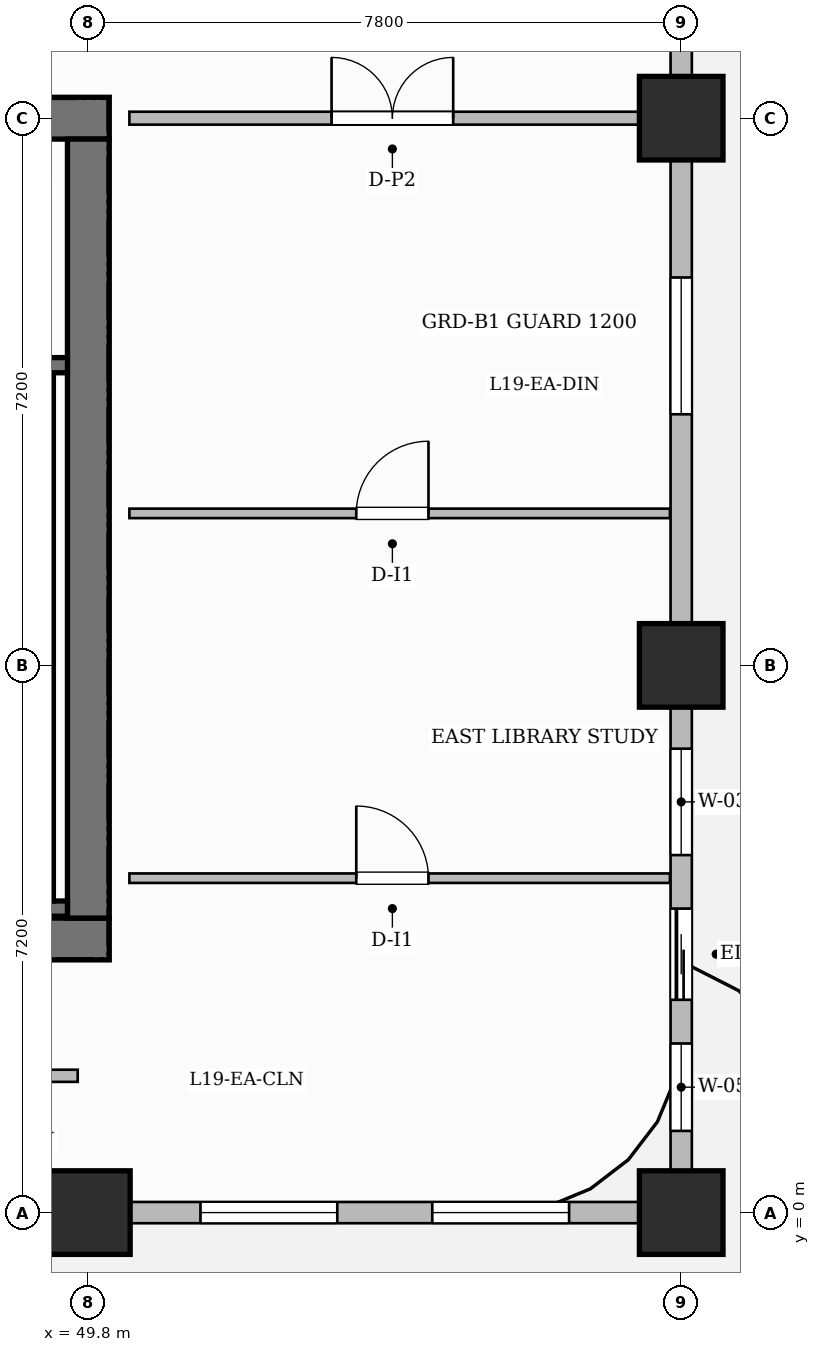
"""IFC4 building model, lengths in metres.
Left out: names, types, materials, properties, quantities, classifications, styles, units other than length and angle.
Written with IfcOpenShell. Run it as: python <this file> out.ifc"""

import sys

from ifc_helpers import new_model, si_unit, direction, frame, frame_2d, origin, origin_2d, place, context, subcontext, project, spatial, rectangle, extrude, source, transform, mapped, element, fill, save


model = new_model("IFC4")
c1 = context("Model", 3, precision=1e-05, world=origin(), true_north=direction((0.0, 1.0)))
c2 = subcontext(c1, "Body", "Model", "MODEL_VIEW")
j1 = project(units=[si_unit("LENGTHUNIT", "METRE"), si_unit("PLANEANGLEUNIT", "RADIAN")], contexts=[c1])
p1 = place(None, origin())
s1 = spatial("IfcSite", under=j1, at=p1, CompositionType="ELEMENT")
p2 = place(p1, origin())
s2 = spatial("IfcBuilding", under=s1, at=p2, CompositionType="ELEMENT")
p3 = place(p2, frame((0.0, 0.0, 80.5)))
s3 = spatial("IfcBuildingStorey", under=s2, at=p3, CompositionType="ELEMENT", Elevation=80.5)
p4 = place(p3, frame((34.525, 3.6, 0.0), z_axis=(0.0, 0.0, 1.0), x_axis=(1.0, 0.0, 0.0)))
e1 = element("IfcWall", 1, at=p4, inside=s3, PredefinedType="SHEAR", context=c2, shape_type="SweptSolid", body=[
    extrude(rectangle(XDim=15.55, YDim=0.55, at=frame_2d((7.775, 0.0))), origin(), (0.0, 0.0, 1.0), 3.7),
])
p5 = place(p4, frame((4.105, 0.0, 0.0)))
e2 = element("IfcOpeningElement", 2, at=p5, cuts=e1, PredefinedType="OPENING", context=c2, shape_type="SweptSolid", body=[
    extrude(rectangle(XDim=0.9, YDim=2.1, at=frame_2d((0.45, 1.05))), frame((0.0, 0.285, 0.0), z_axis=(0.0, -1.0, 0.0), x_axis=(1.0, 0.0, 0.0)), (0.0, 0.0, 1.0), 0.57),
])
p6 = place(p4, frame((5.675, 0.0, 0.0)))
e3 = element("IfcOpeningElement", 3, at=p6, cuts=e1, PredefinedType="OPENING", context=c2, shape_type="SweptSolid", body=[
    extrude(rectangle(XDim=0.9, YDim=2.1, at=frame_2d((0.45, 1.05))), frame((0.0, 0.285, 0.0), z_axis=(0.0, -1.0, 0.0), x_axis=(1.0, 0.0, 0.0)), (0.0, 0.0, 1.0), 0.57),
])
p7 = place(p4, frame((7.275, 0.0, 0.0)))
e4 = element("IfcOpeningElement", 4, at=p7, cuts=e1, PredefinedType="OPENING", context=c2, shape_type="SweptSolid", body=[
    extrude(rectangle(XDim=0.9, YDim=2.1, at=frame_2d((0.45, 1.05))), frame((0.0, 0.285, 0.0), z_axis=(0.0, -1.0, 0.0), x_axis=(1.0, 0.0, 0.0)), (0.0, 0.0, 1.0), 0.57),
])
p8 = place(p3, frame((34.525, 14.4, 0.0), z_axis=(0.0, 0.0, 1.0), x_axis=(1.0, 0.0, 0.0)))
e5 = element("IfcWall", 5, at=p8, inside=s3, PredefinedType="SHEAR", context=c2, shape_type="SweptSolid", body=[
    extrude(rectangle(XDim=15.55, YDim=0.55, at=frame_2d((7.775, 0.0))), origin(), (0.0, 0.0, 1.0), 3.7),
])
p9 = place(p8, frame((5.405, 0.0, 0.0)))
e6 = element("IfcOpeningElement", 6, at=p9, cuts=e5, PredefinedType="OPENING", context=c2, shape_type="SweptSolid", body=[
    extrude(rectangle(XDim=1.5, YDim=2.2, at=frame_2d((0.75, 1.1))), frame((0.0, 0.285, 0.0), z_axis=(0.0, -1.0, 0.0), x_axis=(1.0, 0.0, 0.0)), (0.0, 0.0, 1.0), 0.57),
])
p10 = place(p8, frame((1.62, 0.0, 0.0)))
e7 = element("IfcOpeningElement", 7, at=p10, cuts=e5, PredefinedType="OPENING", context=c2, shape_type="SweptSolid", body=[
    extrude(rectangle(XDim=1.05, YDim=2.15, at=frame_2d((0.525, 1.075))), frame((0.0, 0.285, 0.0), z_axis=(0.0, -1.0, 0.0), x_axis=(1.0, 0.0, 0.0)), (0.0, 0.0, 1.0), 0.57),
])
p11 = place(p8, frame((11.25, 0.0, 0.0)))
e8 = element("IfcOpeningElement", 8, at=p11, cuts=e5, PredefinedType="OPENING", context=c2, shape_type="SweptSolid", body=[
    extrude(rectangle(XDim=1.05, YDim=2.15, at=frame_2d((0.525, 1.075))), frame((0.0, 0.285, 0.0), z_axis=(0.0, -1.0, 0.0), x_axis=(1.0, 0.0, 0.0)), (0.0, 0.0, 1.0), 0.57),
])
p12 = place(p3, frame((49.8, 3.875, 0.0), z_axis=(0.0, 0.0, 1.0), x_axis=(0.0, 1.0, 0.0)))
e9 = element("IfcWall", 9, at=p12, inside=s3, PredefinedType="SHEAR", context=c2, shape_type="SweptSolid", body=[
    extrude(rectangle(XDim=10.25, YDim=0.55, at=frame_2d((5.125, 0.0))), origin(), (0.0, 0.0, 1.0), 3.7),
])
m1 = source(origin(), c2, "Body", "SweptSolid", [
    extrude(rectangle(XDim=1.1, YDim=1.1, at=origin_2d()), origin(), (0.0, 0.0, 1.0), 3.7),
])
for number, where, z_axis, x_axis in (
    (10, (49.8, 0.0, 0.0), (0.0, 0.0, 1.0), (1.0, 0.0, 0.0)),
    (11, (57.6, 0.0, 0.0), (0.0, 0.0, 1.0), (1.0, 0.0, 0.0)),
    (12, (57.6, 7.2, 0.0), (0.0, 0.0, 1.0), (1.0, 0.0, 0.0)),
    (13, (57.6, 14.4, 0.0), (0.0, 0.0, 1.0), (1.0, 0.0, 0.0)),
):
    element("IfcColumn", number, at=place(p3, frame(where, z_axis=z_axis, x_axis=x_axis)), inside=s3, PredefinedType="COLUMN", context=c2, shape_type="MappedRepresentation", body=[
        mapped(m1, transform((0.0, 0.0, 0.0), scale=1.0)),
    ])
p13 = place(p3, frame((43.12, 4.0, 0.0), z_axis=(0.0, 0.0, 1.0), x_axis=(1.0, 0.0, 0.0)))
e14 = element("IfcWall", 14, at=p13, inside=s3, PredefinedType="SHEAR", context=c2, shape_type="SweptSolid", body=[
    extrude(rectangle(XDim=6.405, YDim=0.2, at=frame_2d((3.202, 0.0))), origin(), (0.0, 0.0, 1.0), 3.7),
])
p14 = place(p3, frame((49.24, 4.1, 0.0), z_axis=(0.0, 0.0, 1.0), x_axis=(0.0, 1.0, 0.0)))
e15 = element("IfcWall", 15, at=p14, inside=s3, PredefinedType="SHEAR", context=c2, shape_type="SweptSolid", body=[
    extrude(rectangle(XDim=6.95, YDim=0.2, at=frame_2d((3.475, 0.0))), origin(), (0.0, 0.0, 1.0), 3.7),
])
p15 = place(p3, frame((43.12, 11.15, 0.0), z_axis=(0.0, 0.0, 1.0), x_axis=(1.0, 0.0, 0.0)))
e16 = element("IfcWall", 16, at=p15, inside=s3, PredefinedType="SHEAR", context=c2, shape_type="SweptSolid", body=[
    extrude(rectangle(XDim=6.405, YDim=0.2, at=frame_2d((3.202, 0.0))), origin(), (0.0, 0.0, 1.0), 3.7),
])
p16 = place(p15, frame((1.045, 0.0, 0.0)))
e17 = element("IfcOpeningElement", 17, at=p16, cuts=e16, PredefinedType="OPENING", context=c2, shape_type="SweptSolid", body=[
    extrude(rectangle(XDim=1.05, YDim=2.2, at=frame_2d((0.525, 1.1))), frame((0.0, 0.11, 0.0), z_axis=(0.0, -1.0, 0.0), x_axis=(1.0, 0.0, 0.0)), (0.0, 0.0, 1.0), 0.22),
])
p17 = place(p15, frame((4.125, 0.0, 0.0)))
e18 = element("IfcOpeningElement", 18, at=p17, cuts=e16, PredefinedType="OPENING", context=c2, shape_type="SweptSolid", body=[
    extrude(rectangle(XDim=1.05, YDim=2.2, at=frame_2d((0.525, 1.1))), frame((0.0, 0.11, 0.0), z_axis=(0.0, -1.0, 0.0), x_axis=(1.0, 0.0, 0.0)), (0.0, 0.0, 1.0), 0.22),
])
p18 = place(p3, frame((30.29, 1.8, 0.0), z_axis=(0.0, 0.0, 1.0), x_axis=(1.0, 0.0, 0.0)))
e19 = element("IfcWall", 19, at=p18, inside=s3, PredefinedType="PARTITIONING", context=c2, shape_type="SweptSolid", body=[
    extrude(rectangle(XDim=19.37, YDim=0.16, at=frame_2d((9.685, 0.0))), origin(), (0.0, 0.0, 1.0), 3.45),
])
p19 = place(p18, frame((2.916, 0.0, 0.0)))
e20 = element("IfcOpeningElement", 20, at=p19, cuts=e19, PredefinedType="OPENING", context=c2, shape_type="SweptSolid", body=[
    extrude(rectangle(XDim=0.9, YDim=2.15, at=frame_2d((0.45, 1.075))), frame((0.0, 0.09, 0.0), z_axis=(0.0, -1.0, 0.0), x_axis=(1.0, 0.0, 0.0)), (0.0, 0.0, 1.0), 0.18),
])
p20 = place(p18, frame((9.66, 0.0, 0.0)))
e21 = element("IfcOpeningElement", 21, at=p20, cuts=e19, PredefinedType="OPENING", context=c2, shape_type="SweptSolid", body=[
    extrude(rectangle(XDim=0.9, YDim=2.15, at=frame_2d((0.45, 1.075))), frame((0.0, 0.09, 0.0), z_axis=(0.0, -1.0, 0.0), x_axis=(1.0, 0.0, 0.0)), (0.0, 0.0, 1.0), 0.18),
])
p21 = place(p18, frame((15.86, 0.0, 0.0)))
e22 = element("IfcOpeningElement", 22, at=p21, cuts=e19, PredefinedType="OPENING", context=c2, shape_type="SweptSolid", body=[
    extrude(rectangle(XDim=0.9, YDim=2.15, at=frame_2d((0.45, 1.075))), frame((0.0, 0.09, 0.0), z_axis=(0.0, -1.0, 0.0), x_axis=(1.0, 0.0, 0.0)), (0.0, 0.0, 1.0), 0.18),
])
p22 = place(p3, frame((50.34, 14.4, 0.0), z_axis=(0.0, 0.0, 1.0), x_axis=(1.0, 0.0, 0.0)))
e23 = element("IfcWall", 23, at=p22, inside=s3, PredefinedType="PARTITIONING", context=c2, shape_type="SweptSolid", body=[
    extrude(rectangle(XDim=7.07, YDim=0.17, at=frame_2d((3.535, 0.0))), origin(), (0.0, 0.0, 1.0), 2.885),
])
p23 = place(p22, frame((2.66, 0.0, 0.0)))
e24 = element("IfcOpeningElement", 24, at=p23, cuts=e23, PredefinedType="OPENING", context=c2, shape_type="SweptSolid", body=[
    extrude(rectangle(XDim=1.6, YDim=2.4, at=frame_2d((0.8, 1.2))), frame((0.0, 0.095, 0.0), z_axis=(0.0, -1.0, 0.0), x_axis=(1.0, 0.0, 0.0)), (0.0, 0.0, 1.0), 0.19),
])
p24 = place(p3, frame((50.34, 9.2, 0.0), z_axis=(0.0, 0.0, 1.0), x_axis=(1.0, 0.0, 0.0)))
e25 = element("IfcWall", 25, at=p24, inside=s3, PredefinedType="PARTITIONING", context=c2, shape_type="SweptSolid", body=[
    extrude(rectangle(XDim=7.112, YDim=0.125, at=frame_2d((3.556, 0.0))), origin(), (0.0, 0.0, 1.0), 3.45),
])
p25 = place(p24, frame((2.985, 0.0, 0.0)))
e26 = element("IfcOpeningElement", 26, at=p25, cuts=e25, PredefinedType="OPENING", context=c2, shape_type="SweptSolid", body=[
    extrude(rectangle(XDim=0.95, YDim=2.15, at=frame_2d((0.475, 1.075))), frame((0.0, 0.073, 0.0), z_axis=(0.0, -1.0, 0.0), x_axis=(1.0, 0.0, 0.0)), (0.0, 0.0, 1.0), 0.145),
])
p26 = place(p3, frame((50.34, 4.4, 0.0), z_axis=(0.0, 0.0, 1.0), x_axis=(1.0, 0.0, 0.0)))
e27 = element("IfcWall", 27, at=p26, inside=s3, PredefinedType="PARTITIONING", context=c2, shape_type="SweptSolid", body=[
    extrude(rectangle(XDim=7.112, YDim=0.125, at=frame_2d((3.556, 0.0))), origin(), (0.0, 0.0, 1.0), 3.45),
])
p27 = place(p26, frame((2.985, 0.0, 0.0)))
e28 = element("IfcOpeningElement", 28, at=p27, cuts=e27, PredefinedType="OPENING", context=c2, shape_type="SweptSolid", body=[
    extrude(rectangle(XDim=0.95, YDim=2.15, at=frame_2d((0.475, 1.075))), frame((0.0, 0.073, 0.0), z_axis=(0.0, -1.0, 0.0), x_axis=(1.0, 0.0, 0.0)), (0.0, 0.0, 1.0), 0.145),
])
p28 = place(p3, frame((14.4, 0.0, 0.0), z_axis=(0.0, 0.0, 1.0), x_axis=(1.0, 0.0, 0.0)))
e29 = element("IfcWall", 29, at=p28, inside=s3, PredefinedType="SOLIDWALL", context=c2, shape_type="SweptSolid", body=[
    extrude(rectangle(XDim=43.2, YDim=0.28, at=frame_2d((21.6, 0.0))), origin(), (0.0, 0.0, 1.0), 2.885),
])
p29 = place(p28, frame((0.85, 0.0, 0.0)))
e30 = element("IfcOpeningElement", 30, at=p29, cuts=e29, PredefinedType="OPENING", context=c2, shape_type="SweptSolid", body=[
    extrude(rectangle(XDim=1.2, YDim=2.2, at=frame_2d((0.6, 1.1))), frame((0.0, 0.15, 0.0), z_axis=(0.0, -1.0, 0.0), x_axis=(1.0, 0.0, 0.0)), (0.0, 0.0, 1.0), 0.3),
])
p30 = place(p28, frame((2.811, 0.0, 0.8)))
e31 = element("IfcOpeningElement", 31, at=p30, cuts=e29, PredefinedType="OPENING", context=c2, shape_type="SweptSolid", body=[
    extrude(rectangle(XDim=1.8, YDim=1.85, at=frame_2d((0.9, 0.925))), frame((0.0, 0.15, 0.0), z_axis=(0.0, -1.0, 0.0), x_axis=(1.0, 0.0, 0.0)), (0.0, 0.0, 1.0), 0.3),
])
p31 = place(p28, frame((5.269, 0.0, 0.8)))
e32 = element("IfcOpeningElement", 32, at=p31, cuts=e29, PredefinedType="OPENING", context=c2, shape_type="SweptSolid", body=[
    extrude(rectangle(XDim=0.95, YDim=1.75, at=frame_2d((0.475, 0.875))), frame((0.0, 0.15, 0.0), z_axis=(0.0, -1.0, 0.0), x_axis=(1.0, 0.0, 0.0)), (0.0, 0.0, 1.0), 0.3),
])
p32 = place(p28, frame((8.389, 0.0, 0.8)))
e33 = element("IfcOpeningElement", 33, at=p32, cuts=e29, PredefinedType="OPENING", context=c2, shape_type="SweptSolid", body=[
    extrude(rectangle(XDim=1.8, YDim=1.85, at=frame_2d((0.9, 0.925))), frame((0.0, 0.15, 0.0), z_axis=(0.0, -1.0, 0.0), x_axis=(1.0, 0.0, 0.0)), (0.0, 0.0, 1.0), 0.3),
])
p33 = place(p28, frame((11.197, 0.0, 0.8)))
e34 = element("IfcOpeningElement", 34, at=p33, cuts=e29, PredefinedType="OPENING", context=c2, shape_type="SweptSolid", body=[
    extrude(rectangle(XDim=1.8, YDim=1.85, at=frame_2d((0.9, 0.925))), frame((0.0, 0.15, 0.0), z_axis=(0.0, -1.0, 0.0), x_axis=(1.0, 0.0, 0.0)), (0.0, 0.0, 1.0), 0.3),
])
p34 = place(p28, frame((16.804, 0.0, 0.8)))
e35 = element("IfcOpeningElement", 35, at=p34, cuts=e29, PredefinedType="OPENING", context=c2, shape_type="SweptSolid", body=[
    extrude(rectangle(XDim=1.8, YDim=1.85, at=frame_2d((0.9, 0.925))), frame((0.0, 0.15, 0.0), z_axis=(0.0, -1.0, 0.0), x_axis=(1.0, 0.0, 0.0)), (0.0, 0.0, 1.0), 0.3),
])
p35 = place(p28, frame((21.521, 0.0, 0.8)))
e36 = element("IfcOpeningElement", 36, at=p35, cuts=e29, PredefinedType="OPENING", context=c2, shape_type="SweptSolid", body=[
    extrude(rectangle(XDim=0.95, YDim=1.75, at=frame_2d((0.475, 0.875))), frame((0.0, 0.15, 0.0), z_axis=(0.0, -1.0, 0.0), x_axis=(1.0, 0.0, 0.0)), (0.0, 0.0, 1.0), 0.3),
])
p36 = place(p28, frame((23.904, 0.0, 0.8)))
e37 = element("IfcOpeningElement", 37, at=p36, cuts=e29, PredefinedType="OPENING", context=c2, shape_type="SweptSolid", body=[
    extrude(rectangle(XDim=1.8, YDim=1.85, at=frame_2d((0.9, 0.925))), frame((0.0, 0.15, 0.0), z_axis=(0.0, -1.0, 0.0), x_axis=(1.0, 0.0, 0.0)), (0.0, 0.0, 1.0), 0.3),
])
p37 = place(p28, frame((29.681, 0.0, 0.8)))
e38 = element("IfcOpeningElement", 38, at=p37, cuts=e29, PredefinedType="OPENING", context=c2, shape_type="SweptSolid", body=[
    extrude(rectangle(XDim=1.8, YDim=1.85, at=frame_2d((0.9, 0.925))), frame((0.0, 0.15, 0.0), z_axis=(0.0, -1.0, 0.0), x_axis=(1.0, 0.0, 0.0)), (0.0, 0.0, 1.0), 0.3),
])
p38 = place(p28, frame((32.327, 0.0, 0.8)))
e39 = element("IfcOpeningElement", 39, at=p38, cuts=e29, PredefinedType="OPENING", context=c2, shape_type="SweptSolid", body=[
    extrude(rectangle(XDim=1.8, YDim=1.85, at=frame_2d((0.9, 0.925))), frame((0.0, 0.15, 0.0), z_axis=(0.0, -1.0, 0.0), x_axis=(1.0, 0.0, 0.0)), (0.0, 0.0, 1.0), 0.3),
])
p39 = place(p28, frame((36.875, 0.0, 0.8)))
e40 = element("IfcOpeningElement", 40, at=p39, cuts=e29, PredefinedType="OPENING", context=c2, shape_type="SweptSolid", body=[
    extrude(rectangle(XDim=1.8, YDim=1.85, at=frame_2d((0.9, 0.925))), frame((0.0, 0.15, 0.0), z_axis=(0.0, -1.0, 0.0), x_axis=(1.0, 0.0, 0.0)), (0.0, 0.0, 1.0), 0.3),
])
p40 = place(p28, frame((39.925, 0.0, 0.8)))
e41 = element("IfcOpeningElement", 41, at=p40, cuts=e29, PredefinedType="OPENING", context=c2, shape_type="SweptSolid", body=[
    extrude(rectangle(XDim=1.8, YDim=1.85, at=frame_2d((0.9, 0.925))), frame((0.0, 0.15, 0.0), z_axis=(0.0, -1.0, 0.0), x_axis=(1.0, 0.0, 0.0)), (0.0, 0.0, 1.0), 0.3),
])
p41 = place(p3, frame((57.6, 0.05, 0.0), z_axis=(0.0, 0.0, 1.0), x_axis=(0.0, 1.0, 0.0)))
e42 = element("IfcWall", 42, at=p41, inside=s3, PredefinedType="SOLIDWALL", context=c2, shape_type="SweptSolid", body=[
    extrude(rectangle(XDim=21.5, YDim=0.28, at=frame_2d((10.75, 0.0))), origin(), (0.0, 0.0, 1.0), 2.885),
])
p42 = place(p41, frame((2.75, 0.0, 0.0)))
e43 = element("IfcOpeningElement", 43, at=p42, cuts=e42, PredefinedType="OPENING", context=c2, shape_type="SweptSolid", body=[
    extrude(rectangle(XDim=1.2, YDim=2.2, at=frame_2d((0.6, 1.1))), frame((0.0, 0.15, 0.0), z_axis=(0.0, -1.0, 0.0), x_axis=(1.0, 0.0, 0.0)), (0.0, 0.0, 1.0), 0.3),
])
p43 = place(p41, frame((1.025, 0.0, 0.8)))
e44 = element("IfcOpeningElement", 44, at=p43, cuts=e42, PredefinedType="OPENING", context=c2, shape_type="SweptSolid", body=[
    extrude(rectangle(XDim=1.15, YDim=1.8, at=frame_2d((0.575, 0.9))), frame((0.0, 0.15, 0.0), z_axis=(0.0, -1.0, 0.0), x_axis=(1.0, 0.0, 0.0)), (0.0, 0.0, 1.0), 0.3),
])
p44 = place(p41, frame((4.654, 0.0, 0.8)))
e45 = element("IfcOpeningElement", 45, at=p44, cuts=e42, PredefinedType="OPENING", context=c2, shape_type="SweptSolid", body=[
    extrude(rectangle(XDim=1.4, YDim=1.85, at=frame_2d((0.7, 0.925))), frame((0.0, 0.15, 0.0), z_axis=(0.0, -1.0, 0.0), x_axis=(1.0, 0.0, 0.0)), (0.0, 0.0, 1.0), 0.3),
])
p45 = place(p41, frame((10.454, 0.0, 0.8)))
e46 = element("IfcOpeningElement", 46, at=p45, cuts=e42, PredefinedType="OPENING", context=c2, shape_type="SweptSolid", body=[
    extrude(rectangle(XDim=1.8, YDim=1.85, at=frame_2d((0.9, 0.925))), frame((0.0, 0.15, 0.0), z_axis=(0.0, -1.0, 0.0), x_axis=(1.0, 0.0, 0.0)), (0.0, 0.0, 1.0), 0.3),
])
p46 = place(p41, frame((15.621, 0.0, 0.8)))
e47 = element("IfcOpeningElement", 47, at=p46, cuts=e42, PredefinedType="OPENING", context=c2, shape_type="SweptSolid", body=[
    extrude(rectangle(XDim=1.4, YDim=1.85, at=frame_2d((0.7, 0.925))), frame((0.0, 0.15, 0.0), z_axis=(0.0, -1.0, 0.0), x_axis=(1.0, 0.0, 0.0)), (0.0, 0.0, 1.0), 0.3),
])
p47 = place(p41, frame((18.229, 0.0, 0.8)))
e48 = element("IfcOpeningElement", 48, at=p47, cuts=e42, PredefinedType="OPENING", context=c2, shape_type="SweptSolid", body=[
    extrude(rectangle(XDim=1.8, YDim=1.85, at=frame_2d((0.9, 0.925))), frame((0.0, 0.15, 0.0), z_axis=(0.0, -1.0, 0.0), x_axis=(1.0, 0.0, 0.0)), (0.0, 0.0, 1.0), 0.3),
])
m2 = source(origin(), c2, "Body", "SweptSolid", [
    extrude(rectangle(XDim=1.6, YDim=2.4, at=frame_2d((0.8, 1.2))), frame((0.0, 0.025, 0.0), z_axis=(0.0, -1.0, 0.0), x_axis=(1.0, 0.0, 0.0)), (0.0, 0.0, 1.0), 0.05),
])
p48 = place(p23, origin())
e49 = element("IfcDoor", 49, at=p48, inside=s3, OperationType="DOUBLE_DOOR_SINGLE_SWING", PredefinedType="DOOR", context=c2, shape_type="MappedRepresentation", body=[
    mapped(m2, transform((0.0, 0.0, 0.0), scale=1.0)),
])
fill(e24, e49)
m3 = source(origin(), c2, "Body", "SweptSolid", [
    extrude(rectangle(XDim=0.95, YDim=2.15, at=frame_2d((0.475, 1.075))), frame((0.0, 0.025, 0.0), z_axis=(0.0, -1.0, 0.0), x_axis=(1.0, 0.0, 0.0)), (0.0, 0.0, 1.0), 0.05),
])
p49 = place(p25, origin())
e50 = element("IfcDoor", 50, at=p49, inside=s3, OperationType="SINGLE_SWING_RIGHT", PredefinedType="DOOR", context=c2, shape_type="MappedRepresentation", body=[
    mapped(m3, transform((0.0, 0.0, 0.0), scale=1.0)),
])
fill(e26, e50)
p50 = place(p27, origin())
e51 = element("IfcDoor", 51, at=p50, inside=s3, OperationType="SINGLE_SWING_LEFT", PredefinedType="DOOR", context=c2, shape_type="MappedRepresentation", body=[
    mapped(m3, transform((0.0, 0.0, 0.0), scale=1.0)),
])
fill(e28, e51)
m4 = source(origin(), c2, "Body", "SweptSolid", [
    extrude(rectangle(XDim=1.2, YDim=2.2, at=frame_2d((0.6, 1.1))), frame((0.0, 0.025, 0.0), z_axis=(0.0, -1.0, 0.0), x_axis=(1.0, 0.0, 0.0)), (0.0, 0.0, 1.0), 0.05),
])
p51 = place(p42, origin())
e52 = element("IfcDoor", 52, at=p51, inside=s3, OperationType="SLIDING_TO_LEFT", PredefinedType="DOOR", context=c2, shape_type="MappedRepresentation", body=[
    mapped(m4, transform((0.0, 0.0, 0.0), scale=1.0)),
])
fill(e43, e52)
m5 = source(origin(), c2, "Body", "SweptSolid", [
    extrude(rectangle(XDim=1.8, YDim=1.85, at=frame_2d((0.9, 0.925))), frame((0.0, 0.03, 0.0), z_axis=(0.0, -1.0, 0.0), x_axis=(1.0, 0.0, 0.0)), (0.0, 0.0, 1.0), 0.06),
])
p52 = place(p39, origin())
e53 = element("IfcWindow", 53, at=p52, inside=s3, PartitioningType="DOUBLE_PANEL_VERTICAL", PredefinedType="WINDOW", context=c2, shape_type="MappedRepresentation", body=[
    mapped(m5, transform((0.0, 0.0, 0.0), scale=1.0)),
])
fill(e40, e53)
p53 = place(p40, origin())
e54 = element("IfcWindow", 54, at=p53, inside=s3, PartitioningType="DOUBLE_PANEL_VERTICAL", PredefinedType="WINDOW", context=c2, shape_type="MappedRepresentation", body=[
    mapped(m5, transform((0.0, 0.0, 0.0), scale=1.0)),
])
fill(e41, e54)
m6 = source(origin(), c2, "Body", "SweptSolid", [
    extrude(rectangle(XDim=1.15, YDim=1.8, at=frame_2d((0.575, 0.9))), frame((0.0, 0.03, 0.0), z_axis=(0.0, -1.0, 0.0), x_axis=(1.0, 0.0, 0.0)), (0.0, 0.0, 1.0), 0.06),
])
p54 = place(p43, origin())
e55 = element("IfcWindow", 55, at=p54, inside=s3, PartitioningType="SINGLE_PANEL", PredefinedType="WINDOW", context=c2, shape_type="MappedRepresentation", body=[
    mapped(m6, transform((0.0, 0.0, 0.0), scale=1.0)),
])
fill(e44, e55)
m7 = source(origin(), c2, "Body", "SweptSolid", [
    extrude(rectangle(XDim=1.4, YDim=1.85, at=frame_2d((0.7, 0.925))), frame((0.0, 0.03, 0.0), z_axis=(0.0, -1.0, 0.0), x_axis=(1.0, 0.0, 0.0)), (0.0, 0.0, 1.0), 0.06),
])
p55 = place(p44, origin())
e56 = element("IfcWindow", 56, at=p55, inside=s3, PartitioningType="SINGLE_PANEL", PredefinedType="WINDOW", context=c2, shape_type="MappedRepresentation", body=[
    mapped(m7, transform((0.0, 0.0, 0.0), scale=1.0)),
])
fill(e45, e56)
p56 = place(p45, origin())
e57 = element("IfcWindow", 57, at=p56, inside=s3, PartitioningType="DOUBLE_PANEL_VERTICAL", PredefinedType="WINDOW", context=c2, shape_type="MappedRepresentation", body=[
    mapped(m5, transform((0.0, 0.0, 0.0), scale=1.0)),
])
fill(e46, e57)
save(model, sys.argv[1])
